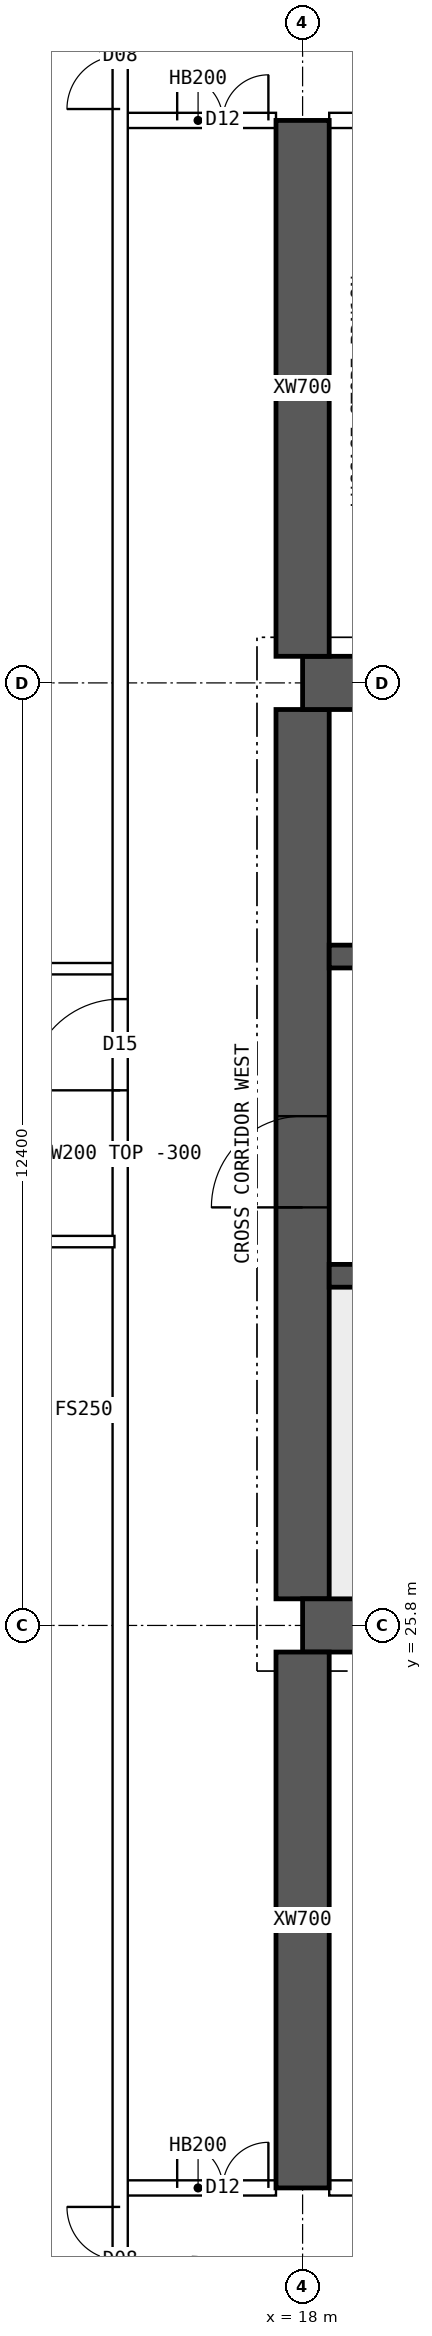
"""IFC4 building model, lengths in metres.
Left out: names, types, materials, properties, quantities, classifications, styles, units other than length and angle.
Written with IfcOpenShell. Run it as: python <this file> out.ifc"""

import sys

from ifc_helpers import new_model, si_unit, direction, frame, frame_2d, origin, place, context, subcontext, project, spatial, polyline, rectangle, outline, extrude, element, fill, save


model = new_model("IFC4")
c1 = context("Model", 3, precision=1e-05, world=origin(), true_north=direction((0.0, 1.0)))
c2 = subcontext(c1, "Body", "Model", "MODEL_VIEW")
j1 = project(units=[si_unit("LENGTHUNIT", "METRE"), si_unit("PLANEANGLEUNIT", "RADIAN")], contexts=[c1])
p1 = place(None, origin())
s1 = spatial("IfcSite", under=j1, at=p1, CompositionType="ELEMENT")
p2 = place(p1, origin())
s2 = spatial("IfcBuilding", under=s1, at=p2, CompositionType="ELEMENT")
p3 = place(p2, frame((0.0, 0.0, 254.05)))
s3 = spatial("IfcBuildingStorey", under=s2, at=p3, CompositionType="ELEMENT", Elevation=254.05)
for number, where, z_axis, x_axis in (
    (1, (18.0, 25.8, 0.0), (0.0, 0.0, 1.0), (1.0, 0.0, 0.0)),
    (2, (18.0, 38.2, 0.0), (0.0, 0.0, 1.0), (1.0, 0.0, 0.0)),
):
    element("IfcWall", number, at=place(p3, frame(where, z_axis=z_axis, x_axis=x_axis)), inside=s3, PredefinedType="SHEAR", context=c2, shape_type="SweptSolid", body=[
        extrude(rectangle(XDim=48.0, YDim=0.7, at=frame_2d((24.0, 0.0))), origin(), (0.0, 0.0, 1.0), 3.75),
    ])
p4 = place(p3, frame((18.0, 26.15, 0.0), z_axis=(0.0, 0.0, 1.0), x_axis=(0.0, 1.0, 0.0)))
e3 = element("IfcWall", 3, at=p4, inside=s3, PredefinedType="SHEAR", context=c2, shape_type="SweptSolid", body=[
    extrude(rectangle(XDim=11.7, YDim=0.7, at=frame_2d((5.85, 0.0))), origin(), (0.0, 0.0, 1.0), 3.75),
])
p5 = place(p4, frame((5.15, 0.0, 0.0)))
e4 = element("IfcOpeningElement", 4, at=p5, cuts=e3, PredefinedType="OPENING", context=c2, shape_type="SweptSolid", body=[
    extrude(rectangle(XDim=1.2, YDim=2.1, at=frame_2d((0.6, 1.05))), frame((0.0, 0.36, 0.0), z_axis=(0.0, -1.0, 0.0), x_axis=(1.0, 0.0, 0.0)), (0.0, 0.0, 1.0), 0.72),
])
p6 = place(p3, frame((18.35, 30.4, 0.0), z_axis=(0.0, 0.0, 1.0), x_axis=(1.0, 0.0, 0.0)))
e5 = element("IfcWall", 5, at=p6, inside=s3, PredefinedType="SHEAR", context=c2, shape_type="SweptSolid", body=[
    extrude(rectangle(XDim=47.3, YDim=0.3, at=frame_2d((23.65, 0.0))), origin(), (0.0, 0.0, 1.0), 3.75),
])
p7 = place(p6, frame((0.4, 0.0, 0.0)))
e6 = element("IfcOpeningElement", 6, at=p7, cuts=e5, PredefinedType="OPENING", context=c2, shape_type="SweptSolid", body=[
    extrude(rectangle(XDim=1.0, YDim=2.1, at=frame_2d((0.5, 1.05))), frame((0.0, 0.16, 0.0), z_axis=(0.0, -1.0, 0.0), x_axis=(1.0, 0.0, 0.0)), (0.0, 0.0, 1.0), 0.32),
])
p8 = place(p6, frame((45.9, 0.0, 0.0)))
e7 = element("IfcOpeningElement", 7, at=p8, cuts=e5, PredefinedType="OPENING", context=c2, shape_type="SweptSolid", body=[
    extrude(rectangle(XDim=1.0, YDim=2.1, at=frame_2d((0.5, 1.05))), frame((0.0, 0.16, 0.0), z_axis=(0.0, -1.0, 0.0), x_axis=(1.0, 0.0, 0.0)), (0.0, 0.0, 1.0), 0.32),
])
p9 = place(p6, frame((8.4, 0.0, 0.0)))
e8 = element("IfcOpeningElement", 8, at=p9, cuts=e5, PredefinedType="OPENING", context=c2, shape_type="SweptSolid", body=[
    extrude(rectangle(XDim=1.1, YDim=2.1, at=frame_2d((0.55, 1.05))), frame((0.0, 0.16, 0.0), z_axis=(0.0, -1.0, 0.0), x_axis=(1.0, 0.0, 0.0)), (0.0, 0.0, 1.0), 0.32),
])
p10 = place(p6, frame((11.0, 0.0, 0.0)))
e9 = element("IfcOpeningElement", 9, at=p10, cuts=e5, PredefinedType="OPENING", context=c2, shape_type="SweptSolid", body=[
    extrude(rectangle(XDim=1.1, YDim=2.1, at=frame_2d((0.55, 1.05))), frame((0.0, 0.16, 0.0), z_axis=(0.0, -1.0, 0.0), x_axis=(1.0, 0.0, 0.0)), (0.0, 0.0, 1.0), 0.32),
])
p11 = place(p6, frame((13.6, 0.0, 0.0)))
e10 = element("IfcOpeningElement", 10, at=p11, cuts=e5, PredefinedType="OPENING", context=c2, shape_type="SweptSolid", body=[
    extrude(rectangle(XDim=1.1, YDim=2.1, at=frame_2d((0.55, 1.05))), frame((0.0, 0.16, 0.0), z_axis=(0.0, -1.0, 0.0), x_axis=(1.0, 0.0, 0.0)), (0.0, 0.0, 1.0), 0.32),
])
p12 = place(p6, frame((16.2, 0.0, 0.0)))
e11 = element("IfcOpeningElement", 11, at=p12, cuts=e5, PredefinedType="OPENING", context=c2, shape_type="SweptSolid", body=[
    extrude(rectangle(XDim=1.1, YDim=2.1, at=frame_2d((0.55, 1.05))), frame((0.0, 0.16, 0.0), z_axis=(0.0, -1.0, 0.0), x_axis=(1.0, 0.0, 0.0)), (0.0, 0.0, 1.0), 0.32),
])
p13 = place(p6, frame((18.975, 0.0, 0.0)))
e12 = element("IfcOpeningElement", 12, at=p13, cuts=e5, PredefinedType="OPENING", context=c2, shape_type="SweptSolid", body=[
    extrude(rectangle(XDim=0.9, YDim=2.1, at=frame_2d((0.45, 1.05))), frame((0.0, 0.16, 0.0), z_axis=(0.0, -1.0, 0.0), x_axis=(1.0, 0.0, 0.0)), (0.0, 0.0, 1.0), 0.32),
])
p14 = place(p6, frame((24.475, 0.0, 0.0)))
e13 = element("IfcOpeningElement", 13, at=p14, cuts=e5, PredefinedType="OPENING", context=c2, shape_type="SweptSolid", body=[
    extrude(rectangle(XDim=0.9, YDim=2.1, at=frame_2d((0.45, 1.05))), frame((0.0, 0.16, 0.0), z_axis=(0.0, -1.0, 0.0), x_axis=(1.0, 0.0, 0.0)), (0.0, 0.0, 1.0), 0.32),
])
p15 = place(p6, frame((30.267, 0.0, 0.0)))
e14 = element("IfcOpeningElement", 14, at=p15, cuts=e5, PredefinedType="OPENING", context=c2, shape_type="SweptSolid", body=[
    extrude(rectangle(XDim=1.1, YDim=2.1, at=frame_2d((0.55, 1.05))), frame((0.0, 0.16, 0.0), z_axis=(0.0, -1.0, 0.0), x_axis=(1.0, 0.0, 0.0)), (0.0, 0.0, 1.0), 0.32),
])
p16 = place(p6, frame((33.8, 0.0, 0.0)))
e15 = element("IfcOpeningElement", 15, at=p16, cuts=e5, PredefinedType="OPENING", context=c2, shape_type="SweptSolid", body=[
    extrude(rectangle(XDim=1.1, YDim=2.1, at=frame_2d((0.55, 1.05))), frame((0.0, 0.16, 0.0), z_axis=(0.0, -1.0, 0.0), x_axis=(1.0, 0.0, 0.0)), (0.0, 0.0, 1.0), 0.32),
])
p17 = place(p6, frame((37.333, 0.0, 0.0)))
e16 = element("IfcOpeningElement", 16, at=p17, cuts=e5, PredefinedType="OPENING", context=c2, shape_type="SweptSolid", body=[
    extrude(rectangle(XDim=1.1, YDim=2.1, at=frame_2d((0.55, 1.05))), frame((0.0, 0.16, 0.0), z_axis=(0.0, -1.0, 0.0), x_axis=(1.0, 0.0, 0.0)), (0.0, 0.0, 1.0), 0.32),
])
p18 = place(p3, frame((18.35, 34.6, 0.0), z_axis=(0.0, 0.0, 1.0), x_axis=(1.0, 0.0, 0.0)))
e17 = element("IfcWall", 17, at=p18, inside=s3, PredefinedType="SHEAR", context=c2, shape_type="SweptSolid", body=[
    extrude(rectangle(XDim=47.3, YDim=0.3, at=frame_2d((23.65, 0.0))), origin(), (0.0, 0.0, 1.0), 3.75),
])
p19 = place(p18, frame((0.9, 0.0, 0.0)))
e18 = element("IfcOpeningElement", 18, at=p19, cuts=e17, PredefinedType="OPENING", context=c2, shape_type="SweptSolid", body=[
    extrude(rectangle(XDim=1.1, YDim=2.1, at=frame_2d((0.55, 1.05))), frame((0.0, 0.16, 0.0), z_axis=(0.0, -1.0, 0.0), x_axis=(1.0, 0.0, 0.0)), (0.0, 0.0, 1.0), 0.32),
])
p20 = place(p18, frame((45.3, 0.0, 0.0)))
e19 = element("IfcOpeningElement", 19, at=p20, cuts=e17, PredefinedType="OPENING", context=c2, shape_type="SweptSolid", body=[
    extrude(rectangle(XDim=1.1, YDim=2.1, at=frame_2d((0.55, 1.05))), frame((0.0, 0.16, 0.0), z_axis=(0.0, -1.0, 0.0), x_axis=(1.0, 0.0, 0.0)), (0.0, 0.0, 1.0), 0.32),
])
p21 = place(p18, frame((4.25, 0.0, 0.0)))
e20 = element("IfcOpeningElement", 20, at=p21, cuts=e17, PredefinedType="OPENING", context=c2, shape_type="SweptSolid", body=[
    extrude(rectangle(XDim=0.9, YDim=2.1, at=frame_2d((0.45, 1.05))), frame((0.0, 0.16, 0.0), z_axis=(0.0, -1.0, 0.0), x_axis=(1.0, 0.0, 0.0)), (0.0, 0.0, 1.0), 0.32),
])
p22 = place(p18, frame((42.15, 0.0, 0.0)))
e21 = element("IfcOpeningElement", 21, at=p22, cuts=e17, PredefinedType="OPENING", context=c2, shape_type="SweptSolid", body=[
    extrude(rectangle(XDim=0.9, YDim=2.1, at=frame_2d((0.45, 1.05))), frame((0.0, 0.16, 0.0), z_axis=(0.0, -1.0, 0.0), x_axis=(1.0, 0.0, 0.0)), (0.0, 0.0, 1.0), 0.32),
])
p23 = place(p18, frame((9.025, 0.0, 0.0)))
e22 = element("IfcOpeningElement", 22, at=p23, cuts=e17, PredefinedType="OPENING", context=c2, shape_type="SweptSolid", body=[
    extrude(rectangle(XDim=0.9, YDim=2.1, at=frame_2d((0.45, 1.05))), frame((0.0, 0.16, 0.0), z_axis=(0.0, -1.0, 0.0), x_axis=(1.0, 0.0, 0.0)), (0.0, 0.0, 1.0), 0.32),
])
p24 = place(p18, frame((12.999, 0.0, 0.0)))
e23 = element("IfcOpeningElement", 23, at=p24, cuts=e17, PredefinedType="OPENING", context=c2, shape_type="SweptSolid", body=[
    extrude(rectangle(XDim=0.9, YDim=2.1, at=frame_2d((0.45, 1.05))), frame((0.0, 0.16, 0.0), z_axis=(0.0, -1.0, 0.0), x_axis=(1.0, 0.0, 0.0)), (0.0, 0.0, 1.0), 0.32),
])
p25 = place(p18, frame((16.646, 0.0, 0.0)))
e24 = element("IfcOpeningElement", 24, at=p25, cuts=e17, PredefinedType="OPENING", context=c2, shape_type="SweptSolid", body=[
    extrude(rectangle(XDim=0.9, YDim=2.1, at=frame_2d((0.45, 1.05))), frame((0.0, 0.16, 0.0), z_axis=(0.0, -1.0, 0.0), x_axis=(1.0, 0.0, 0.0)), (0.0, 0.0, 1.0), 0.32),
])
p26 = place(p18, frame((20.405, 0.0, 0.0)))
e25 = element("IfcOpeningElement", 25, at=p26, cuts=e17, PredefinedType="OPENING", context=c2, shape_type="SweptSolid", body=[
    extrude(rectangle(XDim=0.9, YDim=2.1, at=frame_2d((0.45, 1.05))), frame((0.0, 0.16, 0.0), z_axis=(0.0, -1.0, 0.0), x_axis=(1.0, 0.0, 0.0)), (0.0, 0.0, 1.0), 0.32),
])
p27 = place(p18, frame((24.811, 0.0, 0.0)))
e26 = element("IfcOpeningElement", 26, at=p27, cuts=e17, PredefinedType="OPENING", context=c2, shape_type="SweptSolid", body=[
    extrude(rectangle(XDim=0.9, YDim=2.1, at=frame_2d((0.45, 1.05))), frame((0.0, 0.16, 0.0), z_axis=(0.0, -1.0, 0.0), x_axis=(1.0, 0.0, 0.0)), (0.0, 0.0, 1.0), 0.32),
])
p28 = place(p18, frame((27.608, 0.0, 0.0)))
e27 = element("IfcOpeningElement", 27, at=p28, cuts=e17, PredefinedType="OPENING", context=c2, shape_type="SweptSolid", body=[
    extrude(rectangle(XDim=0.9, YDim=2.1, at=frame_2d((0.45, 1.05))), frame((0.0, 0.16, 0.0), z_axis=(0.0, -1.0, 0.0), x_axis=(1.0, 0.0, 0.0)), (0.0, 0.0, 1.0), 0.32),
])
p29 = place(p18, frame((29.981, 0.0, 0.0)))
e28 = element("IfcOpeningElement", 28, at=p29, cuts=e17, PredefinedType="OPENING", context=c2, shape_type="SweptSolid", body=[
    extrude(rectangle(XDim=0.9, YDim=2.1, at=frame_2d((0.45, 1.05))), frame((0.0, 0.16, 0.0), z_axis=(0.0, -1.0, 0.0), x_axis=(1.0, 0.0, 0.0)), (0.0, 0.0, 1.0), 0.32),
])
p30 = place(p18, frame((35.451, 0.0, 0.0)))
e29 = element("IfcOpeningElement", 29, at=p30, cuts=e17, PredefinedType="OPENING", context=c2, shape_type="SweptSolid", body=[
    extrude(rectangle(XDim=0.9, YDim=2.1, at=frame_2d((0.45, 1.05))), frame((0.0, 0.16, 0.0), z_axis=(0.0, -1.0, 0.0), x_axis=(1.0, 0.0, 0.0)), (0.0, 0.0, 1.0), 0.32),
])
for number, where, z_axis, x_axis in (
    (30, (18.0, 18.4, 0.0), (0.0, 0.0, 1.0), (0.0, 1.0, 0.0)),
    (31, (18.0, 38.55, 0.0), (0.0, 0.0, 1.0), (0.0, 1.0, 0.0)),
):
    element("IfcWall", number, at=place(p3, frame(where, z_axis=z_axis, x_axis=x_axis)), inside=s3, PredefinedType="SHEAR", context=c2, shape_type="SweptSolid", body=[
        extrude(rectangle(XDim=7.05, YDim=0.7, at=frame_2d((3.525, 0.0))), origin(), (0.0, 0.0, 1.0), 3.75),
    ])
p31 = place(p3, frame((15.6, 18.4, 0.0), z_axis=(0.0, 0.0, 1.0), x_axis=(1.0, 0.0, 0.0)))
e32 = element("IfcWall", 32, at=p31, inside=s3, PredefinedType="SOLIDWALL", context=c2, shape_type="SweptSolid", body=[
    extrude(rectangle(XDim=2.05, YDim=0.2, at=frame_2d((1.025, 0.0))), origin(), (0.0, 0.0, 1.0), 3.45),
])
p32 = place(p31, frame((0.75, 0.0, 0.0)))
e33 = element("IfcOpeningElement", 33, at=p32, cuts=e32, PredefinedType="OPENING", context=c2, shape_type="SweptSolid", body=[
    extrude(rectangle(XDim=1.2, YDim=2.1, at=frame_2d((0.6, 1.05))), frame((0.0, 0.11, 0.0), z_axis=(0.0, -1.0, 0.0), x_axis=(1.0, 0.0, 0.0)), (0.0, 0.0, 1.0), 0.22),
])
p33 = place(p3, frame((18.35, 18.4, 0.0), z_axis=(0.0, 0.0, 1.0), x_axis=(1.0, 0.0, 0.0)))
e34 = element("IfcWall", 34, at=p33, inside=s3, PredefinedType="SOLIDWALL", context=c2, shape_type="SweptSolid", body=[
    extrude(rectangle(XDim=5.3, YDim=0.2, at=frame_2d((2.65, 0.0))), origin(), (0.0, 0.0, 1.0), 3.45),
])
p34 = place(p33, frame((0.35, 0.0, 0.0)))
e35 = element("IfcOpeningElement", 35, at=p34, cuts=e34, PredefinedType="OPENING", context=c2, shape_type="SweptSolid", body=[
    extrude(rectangle(XDim=0.9, YDim=2.1, at=frame_2d((0.45, 1.05))), frame((0.0, 0.11, 0.0), z_axis=(0.0, -1.0, 0.0), x_axis=(1.0, 0.0, 0.0)), (0.0, 0.0, 1.0), 0.22),
])
p35 = place(p33, frame((3.185, 0.0, 0.0)))
e36 = element("IfcOpeningElement", 36, at=p35, cuts=e34, PredefinedType="OPENING", context=c2, shape_type="SweptSolid", body=[
    extrude(rectangle(XDim=0.9, YDim=2.1, at=frame_2d((0.45, 1.05))), frame((0.0, 0.11, 0.0), z_axis=(0.0, -1.0, 0.0), x_axis=(1.0, 0.0, 0.0)), (0.0, 0.0, 1.0), 0.22),
])
p36 = place(p3, frame((15.6, 45.6, 0.0), z_axis=(0.0, 0.0, 1.0), x_axis=(1.0, 0.0, 0.0)))
e37 = element("IfcWall", 37, at=p36, inside=s3, PredefinedType="SOLIDWALL", context=c2, shape_type="SweptSolid", body=[
    extrude(rectangle(XDim=2.05, YDim=0.2, at=frame_2d((1.025, 0.0))), origin(), (0.0, 0.0, 1.0), 3.45),
])
p37 = place(p36, frame((0.75, 0.0, 0.0)))
e38 = element("IfcOpeningElement", 38, at=p37, cuts=e37, PredefinedType="OPENING", context=c2, shape_type="SweptSolid", body=[
    extrude(rectangle(XDim=1.2, YDim=2.1, at=frame_2d((0.6, 1.05))), frame((0.0, 0.11, 0.0), z_axis=(0.0, -1.0, 0.0), x_axis=(1.0, 0.0, 0.0)), (0.0, 0.0, 1.0), 0.22),
])
p38 = place(p3, frame((18.35, 45.6, 0.0), z_axis=(0.0, 0.0, 1.0), x_axis=(1.0, 0.0, 0.0)))
e39 = element("IfcWall", 39, at=p38, inside=s3, PredefinedType="SOLIDWALL", context=c2, shape_type="SweptSolid", body=[
    extrude(rectangle(XDim=5.3, YDim=0.2, at=frame_2d((2.65, 0.0))), origin(), (0.0, 0.0, 1.0), 3.45),
])
p39 = place(p38, frame((0.35, 0.0, 0.0)))
e40 = element("IfcOpeningElement", 40, at=p39, cuts=e39, PredefinedType="OPENING", context=c2, shape_type="SweptSolid", body=[
    extrude(rectangle(XDim=0.9, YDim=2.1, at=frame_2d((0.45, 1.05))), frame((0.0, 0.11, 0.0), z_axis=(0.0, -1.0, 0.0), x_axis=(1.0, 0.0, 0.0)), (0.0, 0.0, 1.0), 0.22),
])
p40 = place(p38, frame((2.415, 0.0, 0.0)))
e41 = element("IfcOpeningElement", 41, at=p40, cuts=e39, PredefinedType="OPENING", context=c2, shape_type="SweptSolid", body=[
    extrude(rectangle(XDim=0.9, YDim=2.1, at=frame_2d((0.45, 1.05))), frame((0.0, 0.11, 0.0), z_axis=(0.0, -1.0, 0.0), x_axis=(1.0, 0.0, 0.0)), (0.0, 0.0, 1.0), 0.22),
])
p41 = place(p3, frame((8.705, 30.85, 0.0), z_axis=(0.0, 0.0, 1.0), x_axis=(1.0, 0.0, 0.0)))
e42 = element("IfcWall", 42, at=p41, inside=s3, PredefinedType="PARTITIONING", context=c2, shape_type="SweptSolid", body=[
    extrude(outline(polyline([(0.0, 0.0), (6.82, 0.0), (6.82, 3.45), (3.597, 3.45), (3.595, 3.0), (2.997, 3.0), (2.995, 3.45), (0.0, 3.45), (0.0, 0.0)])), frame((0.0, 0.075, 0.0), z_axis=(0.0, -1.0, 0.0), x_axis=(1.0, 0.0, 0.0)), (0.0, 0.0, 1.0), 0.15),
])
p42 = place(p3, frame((15.6, 11.646, 0.0), z_axis=(0.0, 0.0, 1.0), x_axis=(0.0, 1.0, 0.0)))
e43 = element("IfcWall", 43, at=p42, inside=s3, PredefinedType="SOLIDWALL", context=c2, shape_type="SweptSolid", body=[
    extrude(rectangle(XDim=40.708, YDim=0.2, at=frame_2d((20.354, 0.0))), origin(), (0.0, 0.0, 1.0), 3.45),
])
p43 = place(p42, frame((21.194, 0.0, 0.0)))
e44 = element("IfcOpeningElement", 44, at=p43, cuts=e43, PredefinedType="OPENING", context=c2, shape_type="SweptSolid", body=[
    extrude(rectangle(XDim=1.2, YDim=2.1, at=frame_2d((0.6, 1.05))), frame((0.0, 0.11, 0.0), z_axis=(0.0, -1.0, 0.0), x_axis=(1.0, 0.0, 0.0)), (0.0, 0.0, 1.0), 0.22),
])
p44 = place(p42, frame((5.104, 0.0, 0.0)))
e45 = element("IfcOpeningElement", 45, at=p44, cuts=e43, PredefinedType="OPENING", context=c2, shape_type="SweptSolid", body=[
    extrude(rectangle(XDim=1.4, YDim=2.1, at=frame_2d((0.7, 1.05))), frame((0.0, 0.11, 0.0), z_axis=(0.0, -1.0, 0.0), x_axis=(1.0, 0.0, 0.0)), (0.0, 0.0, 1.0), 0.22),
])
p45 = place(p42, frame((34.104, 0.0, 0.0)))
e46 = element("IfcOpeningElement", 46, at=p45, cuts=e43, PredefinedType="OPENING", context=c2, shape_type="SweptSolid", body=[
    extrude(rectangle(XDim=1.4, YDim=2.1, at=frame_2d((0.7, 1.05))), frame((0.0, 0.11, 0.0), z_axis=(0.0, -1.0, 0.0), x_axis=(1.0, 0.0, 0.0)), (0.0, 0.0, 1.0), 0.22),
])
p46 = place(p3, frame((8.705, 34.44, 0.0), z_axis=(0.0, 0.0, 1.0), x_axis=(1.0, 0.0, 0.0)))
e47 = element("IfcWall", 47, at=p46, inside=s3, PredefinedType="PARTITIONING", context=c2, shape_type="SweptSolid", body=[
    extrude(outline(polyline([(0.0, 0.0), (6.82, 0.0), (6.82, 3.45), (3.597, 3.45), (3.595, 3.0), (2.997, 3.0), (2.995, 3.45), (0.0, 3.45), (0.0, 0.0)])), frame((0.0, 0.075, 0.0), z_axis=(0.0, -1.0, 0.0), x_axis=(1.0, 0.0, 0.0)), (0.0, 0.0, 1.0), 0.15),
])
p47 = place(p5, origin())
e48 = element("IfcDoor", 48, at=p47, inside=s3, OperationType="SINGLE_SWING_LEFT", PredefinedType="DOOR", context=c2, shape_type="SweptSolid", body=[
    extrude(rectangle(XDim=1.2, YDim=2.1, at=frame_2d((0.6, 1.05))), frame((0.0, 0.025, 0.0), z_axis=(0.0, -1.0, 0.0), x_axis=(1.0, 0.0, 0.0)), (0.0, 0.0, 1.0), 0.05),
])
fill(e4, e48)
p48 = place(p32, origin())
e49 = element("IfcDoor", 49, at=p48, inside=s3, OperationType="DOUBLE_DOOR_SINGLE_SWING", PredefinedType="DOOR", context=c2, shape_type="SweptSolid", body=[
    extrude(rectangle(XDim=1.2, YDim=2.1, at=frame_2d((0.6, 1.05))), frame((0.0, 0.025, 0.0), z_axis=(0.0, -1.0, 0.0), x_axis=(1.0, 0.0, 0.0)), (0.0, 0.0, 1.0), 0.05),
])
fill(e33, e49)
p49 = place(p37, origin())
e50 = element("IfcDoor", 50, at=p49, inside=s3, OperationType="DOUBLE_DOOR_SINGLE_SWING", PredefinedType="DOOR", context=c2, shape_type="SweptSolid", body=[
    extrude(rectangle(XDim=1.2, YDim=2.1, at=frame_2d((0.6, 1.05))), frame((0.0, 0.025, 0.0), z_axis=(0.0, -1.0, 0.0), x_axis=(1.0, 0.0, 0.0)), (0.0, 0.0, 1.0), 0.05),
])
fill(e38, e50)
p50 = place(p43, origin())
e51 = element("IfcDoor", 51, at=p50, inside=s3, OperationType="SINGLE_SWING_LEFT", PredefinedType="DOOR", context=c2, shape_type="SweptSolid", body=[
    extrude(rectangle(XDim=1.2, YDim=2.1, at=frame_2d((0.6, 1.05))), frame((0.0, 0.025, 0.0), z_axis=(0.0, -1.0, 0.0), x_axis=(1.0, 0.0, 0.0)), (0.0, 0.0, 1.0), 0.05),
])
fill(e44, e51)
p51 = place(p44, origin())
e52 = element("IfcDoor", 52, at=p51, inside=s3, OperationType="DOUBLE_DOOR_SINGLE_SWING", PredefinedType="DOOR", context=c2, shape_type="SweptSolid", body=[
    extrude(rectangle(XDim=1.4, YDim=2.1, at=frame_2d((0.7, 1.05))), frame((0.0, 0.025, 0.0), z_axis=(0.0, -1.0, 0.0), x_axis=(1.0, 0.0, 0.0)), (0.0, 0.0, 1.0), 0.05),
])
fill(e45, e52)
p52 = place(p45, origin())
e53 = element("IfcDoor", 53, at=p52, inside=s3, OperationType="DOUBLE_DOOR_SINGLE_SWING", PredefinedType="DOOR", context=c2, shape_type="SweptSolid", body=[
    extrude(rectangle(XDim=1.4, YDim=2.1, at=frame_2d((0.7, 1.05))), frame((0.0, 0.025, 0.0), z_axis=(0.0, -1.0, 0.0), x_axis=(1.0, 0.0, 0.0)), (0.0, 0.0, 1.0), 0.05),
])
fill(e46, e53)
save(model, sys.argv[1])
